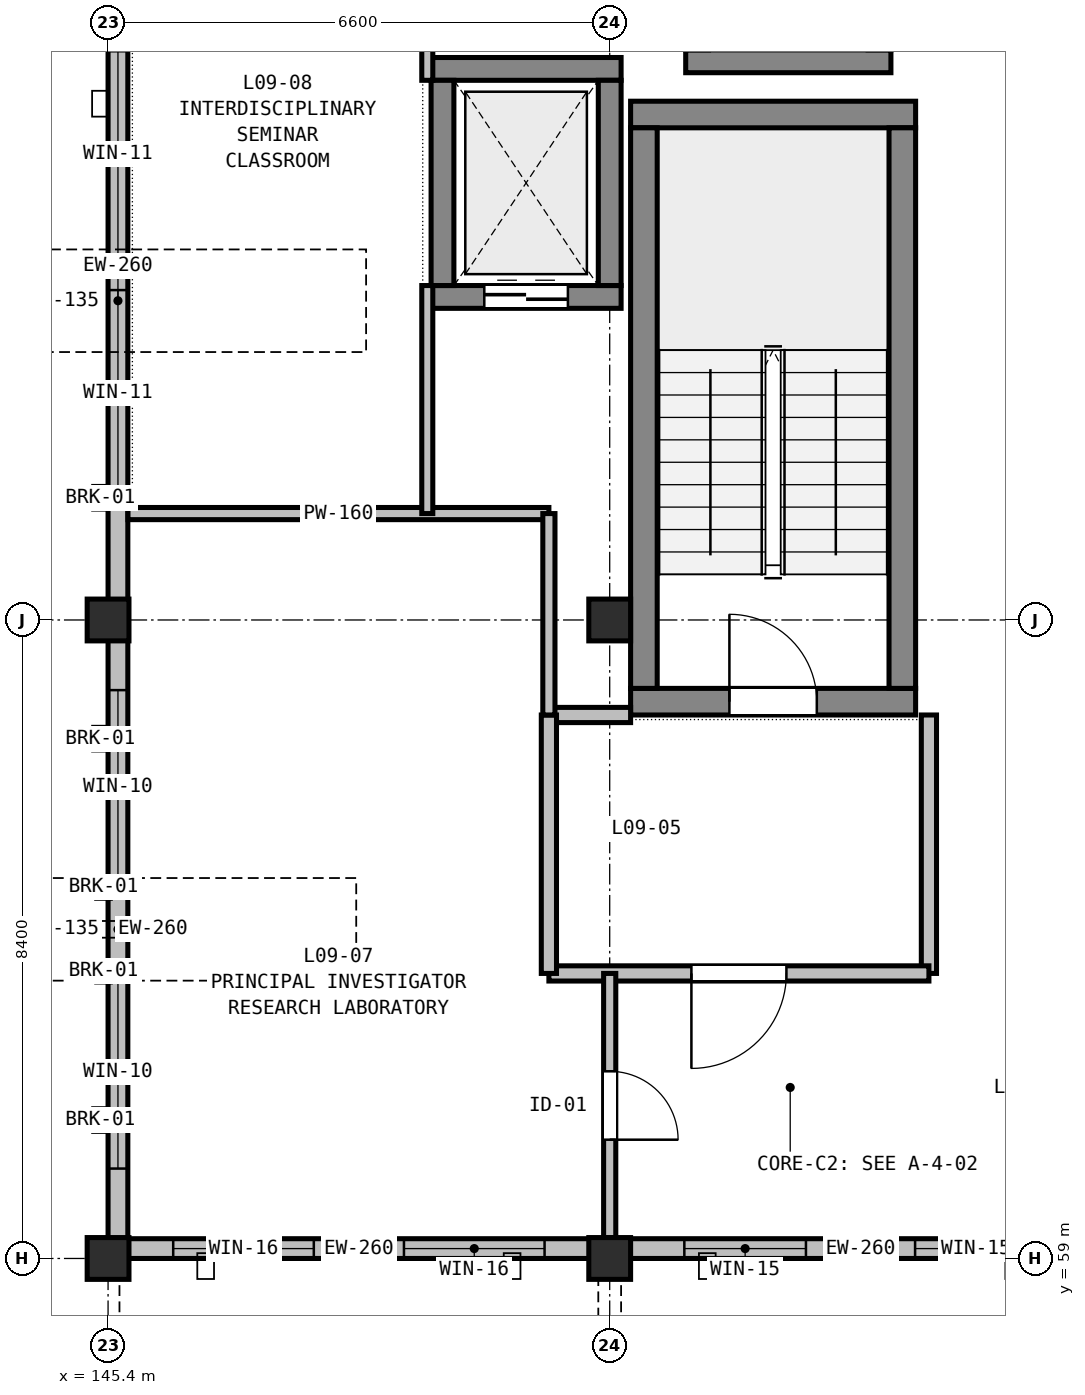
"""IFC4 building model, lengths in metres.
Left out: names, types, materials, properties, quantities, classifications, styles, units other than length and angle.
Written with IfcOpenShell. Run it as: python <this file> out.ifc"""

import sys

from ifc_helpers import new_model, si_unit, direction, frame, frame_2d, origin, origin_2d, place, context, subcontext, project, spatial, rectangle, extrude, element, fill, save


model = new_model("IFC4")
c1 = context("Model", 3, precision=1e-05, world=origin(), true_north=direction((0.0, 1.0)))
c2 = subcontext(c1, "Body", "Model", "MODEL_VIEW")
j1 = project(units=[si_unit("LENGTHUNIT", "METRE"), si_unit("PLANEANGLEUNIT", "RADIAN")], contexts=[c1])
p1 = place(None, origin())
s1 = spatial("IfcSite", under=j1, at=p1, CompositionType="ELEMENT")
p2 = place(p1, origin())
s2 = spatial("IfcBuilding", under=s1, at=p2, CompositionType="ELEMENT")
p3 = place(p2, frame((0.0, 0.0, 40.5)))
s3 = spatial("IfcBuildingStorey", under=s2, at=p3, CompositionType="ELEMENT", Elevation=40.5)
for number, where, z_axis, x_axis in (
    (1, (145.4, 59.0, 0.0), (0.0, 0.0, 1.0), (1.0, 0.0, 0.0)),
    (2, (145.4, 67.4, 0.0), (0.0, 0.0, 1.0), (1.0, 0.0, 0.0)),
    (3, (152.0, 59.0, 0.0), (0.0, 0.0, 1.0), (1.0, 0.0, 0.0)),
):
    element("IfcColumn", number, at=place(p3, frame(where, z_axis=z_axis, x_axis=x_axis)), inside=s3, PredefinedType="COLUMN", context=c2, shape_type="SweptSolid", body=[
        extrude(rectangle(XDim=0.55, YDim=0.55, at=origin_2d()), origin(), (0.0, 0.0, 1.0), 3.84),
    ])
p4 = place(p3, frame((152.0, 67.4, 0.0), z_axis=(0.0, 0.0, 1.0), x_axis=(1.0, 0.0, 0.0)))
e4 = element("IfcColumn", 4, at=p4, inside=s3, PredefinedType="COLUMN", context=c2, shape_type="SweptSolid", body=[
    extrude(rectangle(XDim=0.55, YDim=0.55, at=origin_2d()), origin(), (0.0, 0.0, 1.0), 3.9),
])
p5 = place(p3, frame((152.275, 66.325, 0.0), z_axis=(0.0, 0.0, 1.0), x_axis=(1.0, 0.0, 0.0)))
e5 = element("IfcWall", 5, at=p5, inside=s3, PredefinedType="SHEAR", context=c2, shape_type="SweptSolid", body=[
    extrude(rectangle(XDim=3.75, YDim=0.35, at=frame_2d((1.875, 0.0))), origin(), (0.0, 0.0, 1.0), 3.9),
])
p6 = place(p5, frame((1.3, 0.0, 0.0)))
e6 = element("IfcOpeningElement", 6, at=p6, cuts=e5, PredefinedType="OPENING", context=c2, shape_type="SweptSolid", body=[
    extrude(rectangle(XDim=1.15, YDim=2.15, at=frame_2d((0.575, 1.075))), frame((0.0, 0.185, 0.0), z_axis=(0.0, -1.0, 0.0), x_axis=(1.0, 0.0, 0.0)), (0.0, 0.0, 1.0), 0.37),
])
p7 = place(p3, frame((152.275, 74.05, 0.0), z_axis=(0.0, 0.0, 1.0), x_axis=(1.0, 0.0, 0.0)))
e7 = element("IfcWall", 7, at=p7, inside=s3, PredefinedType="SHEAR", context=c2, shape_type="SweptSolid", body=[
    extrude(rectangle(XDim=3.75, YDim=0.35, at=frame_2d((1.875, 0.0))), origin(), (0.0, 0.0, 1.0), 3.9),
])
for number, where, z_axis, x_axis in (
    (8, (152.45, 66.5, 0.0), (0.0, 0.0, 1.0), (0.0, 1.0, 0.0)),
    (9, (155.85, 66.5, 0.0), (0.0, 0.0, 1.0), (0.0, 1.0, 0.0)),
):
    element("IfcWall", number, at=place(p3, frame(where, z_axis=z_axis, x_axis=x_axis)), inside=s3, PredefinedType="SHEAR", context=c2, shape_type="SweptSolid", body=[
        extrude(rectangle(XDim=7.375, YDim=0.35, at=frame_2d((3.688, 0.0))), origin(), (0.0, 0.0, 1.0), 3.9),
    ])
p8 = place(p3, frame((149.65, 71.65, 0.0), z_axis=(0.0, 0.0, 1.0), x_axis=(1.0, 0.0, 0.0)))
e10 = element("IfcWall", 10, at=p8, inside=s3, PredefinedType="SHEAR", context=c2, shape_type="SweptSolid", body=[
    extrude(rectangle(XDim=2.5, YDim=0.3, at=frame_2d((1.25, 0.0))), origin(), (0.0, 0.0, 1.0), 3.9),
])
p9 = place(p8, frame((0.7, 0.0, 0.0)))
e11 = element("IfcOpeningElement", 11, at=p9, cuts=e10, PredefinedType="OPENING", context=c2, shape_type="SweptSolid", body=[
    extrude(rectangle(XDim=1.1, YDim=2.1, at=frame_2d((0.55, 1.05))), frame((0.0, 0.16, 0.0), z_axis=(0.0, -1.0, 0.0), x_axis=(1.0, 0.0, 0.0)), (0.0, 0.0, 1.0), 0.32),
])
p10 = place(p3, frame((149.65, 74.65, 0.0), z_axis=(0.0, 0.0, 1.0), x_axis=(1.0, 0.0, 0.0)))
e12 = element("IfcWall", 12, at=p10, inside=s3, PredefinedType="SHEAR", context=c2, shape_type="SweptSolid", body=[
    extrude(rectangle(XDim=2.5, YDim=0.3, at=frame_2d((1.25, 0.0))), origin(), (0.0, 0.0, 1.0), 3.9),
])
for number, where, z_axis, x_axis in (
    (13, (149.8, 71.8, 0.0), (0.0, 0.0, 1.0), (0.0, 1.0, 0.0)),
    (14, (152.0, 71.8, 0.0), (0.0, 0.0, 1.0), (0.0, 1.0, 0.0)),
):
    element("IfcWall", number, at=place(p3, frame(where, z_axis=z_axis, x_axis=x_axis)), inside=s3, PredefinedType="SHEAR", context=c2, shape_type="SweptSolid", body=[
        extrude(rectangle(XDim=2.7, YDim=0.3, at=frame_2d((1.35, 0.0))), origin(), (0.0, 0.0, 1.0), 3.9),
    ])
p11 = place(p3, frame((153.0, 74.75, 0.0), z_axis=(0.0, 0.0, 1.0), x_axis=(1.0, 0.0, 0.0)))
e15 = element("IfcWall", 15, at=p11, inside=s3, PredefinedType="SHEAR", context=c2, shape_type="SweptSolid", body=[
    extrude(rectangle(XDim=2.7, YDim=0.3, at=frame_2d((1.35, 0.0))), origin(), (0.0, 0.0, 1.0), 3.84),
])
p12 = place(p3, frame((145.53, 59.26, 0.0), z_axis=(0.0, 0.0, 1.0), x_axis=(0.0, 1.0, 0.0)))
e16 = element("IfcWall", 16, at=p12, inside=s3, PredefinedType="STANDARD", context=c2, shape_type="SweptSolid", body=[
    extrude(rectangle(XDim=8.14, YDim=0.26, at=frame_2d((4.07, 0.0))), origin(), (0.0, 0.0, 1.0), 3.285),
])
p13 = place(p12, frame((0.923, 0.0, 0.75)))
e17 = element("IfcOpeningElement", 17, at=p13, cuts=e16, PredefinedType="OPENING", context=c2, shape_type="SweptSolid", body=[
    extrude(rectangle(XDim=2.55, YDim=2.15, at=frame_2d((1.275, 1.075))), frame((0.0, 0.14, 0.0), z_axis=(0.0, -1.0, 0.0), x_axis=(1.0, 0.0, 0.0)), (0.0, 0.0, 1.0), 0.28),
])
p14 = place(p12, frame((4.667, 0.0, 0.75)))
e18 = element("IfcOpeningElement", 18, at=p14, cuts=e16, PredefinedType="OPENING", context=c2, shape_type="SweptSolid", body=[
    extrude(rectangle(XDim=2.55, YDim=2.15, at=frame_2d((1.275, 1.075))), frame((0.0, 0.14, 0.0), z_axis=(0.0, -1.0, 0.0), x_axis=(1.0, 0.0, 0.0)), (0.0, 0.0, 1.0), 0.28),
])
p15 = place(p3, frame((145.53, 67.4, 0.0), z_axis=(0.0, 0.0, 1.0), x_axis=(0.0, 1.0, 0.0)))
e19 = element("IfcWall", 19, at=p15, inside=s3, PredefinedType="STANDARD", context=c2, shape_type="SweptSolid", body=[
    extrude(rectangle(XDim=8.4, YDim=0.26, at=frame_2d((4.2, 0.0))), origin(), (0.0, 0.0, 1.0), 3.285),
])
p16 = place(p15, frame((1.64, 0.0, 0.75)))
e20 = element("IfcOpeningElement", 20, at=p16, cuts=e19, PredefinedType="OPENING", context=c2, shape_type="SweptSolid", body=[
    extrude(rectangle(XDim=2.7, YDim=2.2, at=frame_2d((1.35, 1.1))), frame((0.0, 0.14, 0.0), z_axis=(0.0, -1.0, 0.0), x_axis=(1.0, 0.0, 0.0)), (0.0, 0.0, 1.0), 0.28),
])
p17 = place(p15, frame((4.782, 0.0, 0.75)))
e21 = element("IfcOpeningElement", 21, at=p17, cuts=e19, PredefinedType="OPENING", context=c2, shape_type="SweptSolid", body=[
    extrude(rectangle(XDim=2.7, YDim=2.2, at=frame_2d((1.35, 1.1))), frame((0.0, 0.14, 0.0), z_axis=(0.0, -1.0, 0.0), x_axis=(1.0, 0.0, 0.0)), (0.0, 0.0, 1.0), 0.28),
])
p18 = place(p3, frame((158.6, 59.13, 0.0), z_axis=(0.0, 0.0, 1.0), x_axis=(-1.0, 0.0, 0.0)))
e22 = element("IfcWall", 22, at=p18, inside=s3, PredefinedType="STANDARD", context=c2, shape_type="SweptSolid", body=[
    extrude(rectangle(XDim=6.6, YDim=0.26, at=frame_2d((3.3, 0.0))), origin(), (0.0, 0.0, 1.0), 3.185),
])
p19 = place(p18, frame((0.982, 0.0, 0.9)))
e23 = element("IfcOpeningElement", 23, at=p19, cuts=e22, PredefinedType="OPENING", context=c2, shape_type="SweptSolid", body=[
    extrude(rectangle(XDim=1.6, YDim=1.6, at=frame_2d((0.8, 0.8))), frame((0.0, 0.14, 0.0), z_axis=(0.0, -1.0, 0.0), x_axis=(1.0, 0.0, 0.0)), (0.0, 0.0, 1.0), 0.28),
])
p20 = place(p18, frame((4.018, 0.0, 0.9)))
e24 = element("IfcOpeningElement", 24, at=p20, cuts=e22, PredefinedType="OPENING", context=c2, shape_type="SweptSolid", body=[
    extrude(rectangle(XDim=1.6, YDim=1.6, at=frame_2d((0.8, 0.8))), frame((0.0, 0.14, 0.0), z_axis=(0.0, -1.0, 0.0), x_axis=(1.0, 0.0, 0.0)), (0.0, 0.0, 1.0), 0.28),
])
p21 = place(p3, frame((152.0, 59.13, 0.0), z_axis=(0.0, 0.0, 1.0), x_axis=(-1.0, 0.0, 0.0)))
e25 = element("IfcWall", 25, at=p21, inside=s3, PredefinedType="STANDARD", context=c2, shape_type="SweptSolid", body=[
    extrude(rectangle(XDim=6.6, YDim=0.26, at=frame_2d((3.3, 0.0))), origin(), (0.0, 0.0, 1.0), 3.185),
])
p22 = place(p21, frame((0.857, 0.0, 0.9)))
e26 = element("IfcOpeningElement", 26, at=p22, cuts=e25, PredefinedType="OPENING", context=c2, shape_type="SweptSolid", body=[
    extrude(rectangle(XDim=1.85, YDim=1.6, at=frame_2d((0.925, 0.8))), frame((0.0, 0.14, 0.0), z_axis=(0.0, -1.0, 0.0), x_axis=(1.0, 0.0, 0.0)), (0.0, 0.0, 1.0), 0.28),
])
p23 = place(p21, frame((3.893, 0.0, 0.9)))
e27 = element("IfcOpeningElement", 27, at=p23, cuts=e25, PredefinedType="OPENING", context=c2, shape_type="SweptSolid", body=[
    extrude(rectangle(XDim=1.85, YDim=1.6, at=frame_2d((0.925, 0.8))), frame((0.0, 0.14, 0.0), z_axis=(0.0, -1.0, 0.0), x_axis=(1.0, 0.0, 0.0)), (0.0, 0.0, 1.0), 0.28),
])
p24 = place(p3, frame((151.2, 66.15, 0.0), z_axis=(0.0, 0.0, 1.0), x_axis=(1.0, 0.0, 0.0)))
e28 = element("IfcWall", 28, at=p24, inside=s3, PredefinedType="PARTITIONING", context=c2, shape_type="SweptSolid", body=[
    extrude(rectangle(XDim=1.075, YDim=0.2, at=frame_2d((0.538, 0.0))), origin(), (0.0, 0.0, 1.0), 3.185),
])
p25 = place(p3, frame((156.2, 66.15, 0.0), z_axis=(0.0, 0.0, 1.0), x_axis=(0.0, -1.0, 0.0)))
e29 = element("IfcWall", 29, at=p25, inside=s3, PredefinedType="PARTITIONING", context=c2, shape_type="SweptSolid", body=[
    extrude(rectangle(XDim=3.4, YDim=0.2, at=frame_2d((1.7, 0.0))), origin(), (0.0, 0.0, 1.0), 3.655),
])
p26 = place(p3, frame((156.2, 62.75, 0.0), z_axis=(0.0, 0.0, 1.0), x_axis=(-1.0, 0.0, 0.0)))
e30 = element("IfcWall", 30, at=p26, inside=s3, PredefinedType="PARTITIONING", context=c2, shape_type="SweptSolid", body=[
    extrude(rectangle(XDim=5.0, YDim=0.2, at=frame_2d((2.5, 0.0))), origin(), (0.0, 0.0, 1.0), 3.185),
])
p27 = place(p26, frame((1.875, 0.0, 0.0)))
e31 = element("IfcOpeningElement", 31, at=p27, cuts=e30, PredefinedType="OPENING", context=c2, shape_type="SweptSolid", body=[
    extrude(rectangle(XDim=1.25, YDim=2.15, at=frame_2d((0.625, 1.075))), frame((0.0, 0.11, 0.0), z_axis=(0.0, -1.0, 0.0), x_axis=(1.0, 0.0, 0.0)), (0.0, 0.0, 1.0), 0.22),
])
p28 = place(p3, frame((151.2, 62.75, 0.0), z_axis=(0.0, 0.0, 1.0), x_axis=(0.0, 1.0, 0.0)))
e32 = element("IfcWall", 32, at=p28, inside=s3, PredefinedType="PARTITIONING", context=c2, shape_type="SweptSolid", body=[
    extrude(rectangle(XDim=3.4, YDim=0.2, at=frame_2d((1.7, 0.0))), origin(), (0.0, 0.0, 1.0), 3.655),
])
p29 = place(p3, frame((145.662, 68.8, 0.0), z_axis=(0.0, 0.0, 1.0), x_axis=(1.0, 0.0, 0.0)))
e33 = element("IfcWall", 33, at=p29, inside=s3, PredefinedType="PARTITIONING", context=c2, shape_type="SweptSolid", body=[
    extrude(rectangle(XDim=5.538, YDim=0.16, at=frame_2d((2.769, 0.0))), origin(), (0.0, 0.0, 1.0), 3.335),
])
p30 = place(p3, frame((151.2, 68.8, 0.0), z_axis=(0.0, 0.0, 1.0), x_axis=(0.0, -1.0, 0.0)))
e34 = element("IfcWall", 34, at=p30, inside=s3, PredefinedType="PARTITIONING", context=c2, shape_type="SweptSolid", body=[
    extrude(rectangle(XDim=2.65, YDim=0.16, at=frame_2d((1.325, 0.0))), origin(), (0.0, 0.0, 1.0), 3.285),
])
p31 = place(p3, frame((152.0, 62.75, 0.0), z_axis=(0.0, 0.0, 1.0), x_axis=(0.0, -1.0, 0.0)))
e35 = element("IfcWall", 35, at=p31, inside=s3, PredefinedType="PARTITIONING", context=c2, shape_type="SweptSolid", body=[
    extrude(rectangle(XDim=3.475, YDim=0.16, at=frame_2d((1.738, 0.0))), origin(), (0.0, 0.0, 1.0), 3.185),
])
p32 = place(p31, frame((1.288, 0.0, 0.0)))
e36 = element("IfcOpeningElement", 36, at=p32, cuts=e35, PredefinedType="OPENING", context=c2, shape_type="SweptSolid", body=[
    extrude(rectangle(XDim=0.9, YDim=2.02, at=frame_2d((0.45, 1.01))), frame((0.0, 0.09, 0.0), z_axis=(0.0, -1.0, 0.0), x_axis=(1.0, 0.0, 0.0)), (0.0, 0.0, 1.0), 0.18),
])
p33 = place(p3, frame((149.6, 78.0, 0.0), z_axis=(0.0, 0.0, 1.0), x_axis=(0.0, -1.0, 0.0)))
e37 = element("IfcWall", 37, at=p33, inside=s3, PredefinedType="PARTITIONING", context=c2, shape_type="SweptSolid", body=[
    extrude(rectangle(XDim=3.5, YDim=0.145, at=frame_2d((1.75, 0.0))), origin(), (0.0, 0.0, 1.0), 3.285),
])
p34 = place(p3, frame((149.6, 71.8, 0.0), z_axis=(0.0, 0.0, 1.0), x_axis=(0.0, -1.0, 0.0)))
e38 = element("IfcWall", 38, at=p34, inside=s3, PredefinedType="PARTITIONING", context=c2, shape_type="SweptSolid", body=[
    extrude(rectangle(XDim=3.0, YDim=0.145, at=frame_2d((1.5, 0.0))), origin(), (0.0, 0.0, 1.0), 3.655),
])
p35 = place(p13, origin())
e39 = element("IfcWindow", 39, at=p35, inside=s3, PartitioningType="SINGLE_PANEL", PredefinedType="WINDOW", context=c2, shape_type="SweptSolid", body=[
    extrude(rectangle(XDim=2.55, YDim=2.15, at=frame_2d((1.275, 1.075))), frame((0.0, 0.03, 0.0), z_axis=(0.0, -1.0, 0.0), x_axis=(1.0, 0.0, 0.0)), (0.0, 0.0, 1.0), 0.06),
])
fill(e17, e39)
p36 = place(p14, origin())
e40 = element("IfcWindow", 40, at=p36, inside=s3, PartitioningType="SINGLE_PANEL", PredefinedType="WINDOW", context=c2, shape_type="SweptSolid", body=[
    extrude(rectangle(XDim=2.55, YDim=2.15, at=frame_2d((1.275, 1.075))), frame((0.0, 0.03, 0.0), z_axis=(0.0, -1.0, 0.0), x_axis=(1.0, 0.0, 0.0)), (0.0, 0.0, 1.0), 0.06),
])
fill(e18, e40)
p37 = place(p16, origin())
e41 = element("IfcWindow", 41, at=p37, inside=s3, PartitioningType="SINGLE_PANEL", PredefinedType="WINDOW", context=c2, shape_type="SweptSolid", body=[
    extrude(rectangle(XDim=2.7, YDim=2.2, at=frame_2d((1.35, 1.1))), frame((0.0, 0.03, 0.0), z_axis=(0.0, -1.0, 0.0), x_axis=(1.0, 0.0, 0.0)), (0.0, 0.0, 1.0), 0.06),
])
fill(e20, e41)
p38 = place(p17, origin())
e42 = element("IfcWindow", 42, at=p38, inside=s3, PartitioningType="SINGLE_PANEL", PredefinedType="WINDOW", context=c2, shape_type="SweptSolid", body=[
    extrude(rectangle(XDim=2.7, YDim=2.2, at=frame_2d((1.35, 1.1))), frame((0.0, 0.03, 0.0), z_axis=(0.0, -1.0, 0.0), x_axis=(1.0, 0.0, 0.0)), (0.0, 0.0, 1.0), 0.06),
])
fill(e21, e42)
p39 = place(p19, origin())
e43 = element("IfcWindow", 43, at=p39, inside=s3, PartitioningType="SINGLE_PANEL", PredefinedType="WINDOW", context=c2, shape_type="SweptSolid", body=[
    extrude(rectangle(XDim=1.6, YDim=1.6, at=frame_2d((0.8, 0.8))), frame((0.0, 0.03, 0.0), z_axis=(0.0, -1.0, 0.0), x_axis=(1.0, 0.0, 0.0)), (0.0, 0.0, 1.0), 0.06),
])
fill(e23, e43)
p40 = place(p20, origin())
e44 = element("IfcWindow", 44, at=p40, inside=s3, PartitioningType="SINGLE_PANEL", PredefinedType="WINDOW", context=c2, shape_type="SweptSolid", body=[
    extrude(rectangle(XDim=1.6, YDim=1.6, at=frame_2d((0.8, 0.8))), frame((0.0, 0.03, 0.0), z_axis=(0.0, -1.0, 0.0), x_axis=(1.0, 0.0, 0.0)), (0.0, 0.0, 1.0), 0.06),
])
fill(e24, e44)
p41 = place(p22, origin())
e45 = element("IfcWindow", 45, at=p41, inside=s3, PartitioningType="SINGLE_PANEL", PredefinedType="WINDOW", context=c2, shape_type="SweptSolid", body=[
    extrude(rectangle(XDim=1.85, YDim=1.6, at=frame_2d((0.925, 0.8))), frame((0.0, 0.03, 0.0), z_axis=(0.0, -1.0, 0.0), x_axis=(1.0, 0.0, 0.0)), (0.0, 0.0, 1.0), 0.06),
])
fill(e26, e45)
p42 = place(p23, origin())
e46 = element("IfcWindow", 46, at=p42, inside=s3, PartitioningType="SINGLE_PANEL", PredefinedType="WINDOW", context=c2, shape_type="SweptSolid", body=[
    extrude(rectangle(XDim=1.85, YDim=1.6, at=frame_2d((0.925, 0.8))), frame((0.0, 0.03, 0.0), z_axis=(0.0, -1.0, 0.0), x_axis=(1.0, 0.0, 0.0)), (0.0, 0.0, 1.0), 0.06),
])
fill(e27, e46)
p43 = place(p6, origin())
e47 = element("IfcDoor", 47, at=p43, inside=s3, OperationType="SINGLE_SWING_LEFT", PredefinedType="DOOR", context=c2, shape_type="SweptSolid", body=[
    extrude(rectangle(XDim=1.15, YDim=2.15, at=frame_2d((0.575, 1.075))), frame((0.0, 0.025, 0.0), z_axis=(0.0, -1.0, 0.0), x_axis=(1.0, 0.0, 0.0)), (0.0, 0.0, 1.0), 0.05),
])
fill(e6, e47)
p44 = place(p9, origin())
e48 = element("IfcDoor", 48, at=p44, inside=s3, OperationType="DOUBLE_DOOR_SLIDING", PredefinedType="DOOR", context=c2, shape_type="SweptSolid", body=[
    extrude(rectangle(XDim=1.1, YDim=2.1, at=frame_2d((0.55, 1.05))), frame((0.0, 0.025, 0.0), z_axis=(0.0, -1.0, 0.0), x_axis=(1.0, 0.0, 0.0)), (0.0, 0.0, 1.0), 0.05),
])
fill(e11, e48)
p45 = place(p27, origin())
e49 = element("IfcDoor", 49, at=p45, inside=s3, OperationType="SINGLE_SWING_RIGHT", PredefinedType="DOOR", context=c2, shape_type="SweptSolid", body=[
    extrude(rectangle(XDim=1.25, YDim=2.15, at=frame_2d((0.625, 1.075))), frame((0.0, 0.025, 0.0), z_axis=(0.0, -1.0, 0.0), x_axis=(1.0, 0.0, 0.0)), (0.0, 0.0, 1.0), 0.05),
])
fill(e31, e49)
p46 = place(p32, origin())
e50 = element("IfcDoor", 50, at=p46, inside=s3, OperationType="SINGLE_SWING_RIGHT", PredefinedType="DOOR", context=c2, shape_type="SweptSolid", body=[
    extrude(rectangle(XDim=0.9, YDim=2.02, at=frame_2d((0.45, 1.01))), frame((0.0, 0.025, 0.0), z_axis=(0.0, -1.0, 0.0), x_axis=(1.0, 0.0, 0.0)), (0.0, 0.0, 1.0), 0.05),
])
fill(e36, e50)
save(model, sys.argv[1])
